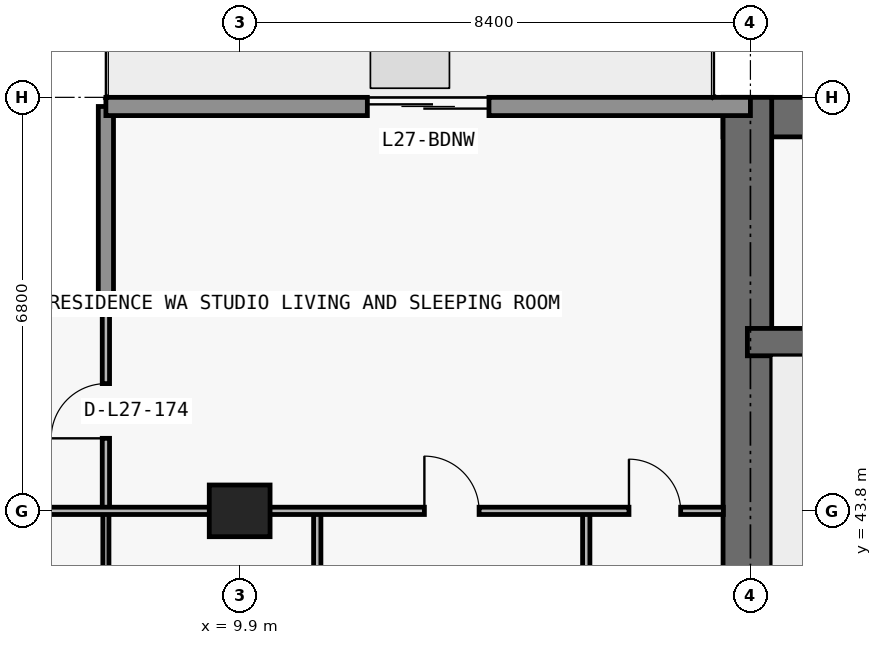
"""IFC4 building model, lengths in metres.
Left out: names, types, materials, properties, quantities, classifications, styles, units other than length and angle.
Written with IfcOpenShell. Run it as: python <this file> out.ifc"""

import sys

from ifc_helpers import new_model, si_unit, direction, frame, frame_2d, origin, origin_2d, place, context, subcontext, project, spatial, rectangle, extrude, element, fill, save


model = new_model("IFC4")
c1 = context("Model", 3, precision=1e-05, world=origin(), true_north=direction((0.0, 1.0)))
c2 = subcontext(c1, "Body", "Model", "MODEL_VIEW")
j1 = project(units=[si_unit("LENGTHUNIT", "METRE"), si_unit("PLANEANGLEUNIT", "RADIAN")], contexts=[c1])
p1 = place(None, origin())
s1 = spatial("IfcSite", under=j1, at=p1, CompositionType="ELEMENT")
p2 = place(p1, origin())
s2 = spatial("IfcBuilding", under=s1, at=p2, CompositionType="ELEMENT")
p3 = place(p2, frame((0.0, 0.0, 102.6)))
s3 = spatial("IfcBuildingStorey", under=s2, at=p3, CompositionType="ELEMENT", Elevation=102.6)
p4 = place(p3, frame((9.9, 43.8, 0.0), z_axis=(0.0, 0.0, 1.0), x_axis=(1.0, 0.0, 0.0)))
e1 = element("IfcColumn", 1, at=p4, inside=s3, PredefinedType="COLUMN", context=c2, shape_type="SweptSolid", body=[
    extrude(rectangle(XDim=1.0, YDim=0.85, at=origin_2d()), origin(), (0.0, 0.0, 1.0), 3.05),
])
p5 = place(p3, frame((17.85, 50.275, 0.0), z_axis=(0.0, 0.0, 1.0), x_axis=(1.0, 0.0, 0.0)))
e2 = element("IfcWall", 2, at=p5, inside=s3, PredefinedType="SHEAR", context=c2, shape_type="SweptSolid", body=[
    extrude(rectangle(XDim=42.1, YDim=0.65, at=frame_2d((21.05, 0.0))), origin(), (0.0, 0.0, 1.0), 3.05),
])
p6 = place(p3, frame((18.25, 36.55, 0.0), z_axis=(0.0, 0.0, 1.0), x_axis=(0.0, 1.0, 0.0)))
e3 = element("IfcWall", 3, at=p6, inside=s3, PredefinedType="SHEAR", context=c2, shape_type="SweptSolid", body=[
    extrude(rectangle(XDim=14.05, YDim=0.8, at=frame_2d((7.025, 0.0))), origin(), (0.0, 0.0, 1.0), 3.05),
])
p7 = place(p3, frame((18.25, 46.575, 0.0), z_axis=(0.0, 0.0, 1.0), x_axis=(1.0, 0.0, 0.0)))
e4 = element("IfcWall", 4, at=p7, inside=s3, PredefinedType="SHEAR", context=c2, shape_type="SweptSolid", body=[
    extrude(rectangle(XDim=41.3, YDim=0.45, at=frame_2d((20.65, 0.0))), origin(), (0.0, 0.0, 1.0), 3.05),
])
p8 = place(p7, frame((7.65, 0.0, 0.0)))
e5 = element("IfcOpeningElement", 5, at=p8, cuts=e4, PredefinedType="OPENING", context=c2, shape_type="SweptSolid", body=[
    extrude(rectangle(XDim=1.0, YDim=2.2, at=frame_2d((0.5, 1.1))), frame((0.0, 0.235, 0.0), z_axis=(0.0, -1.0, 0.0), x_axis=(1.0, 0.0, 0.0)), (0.0, 0.0, 1.0), 0.47),
])
p9 = place(p7, frame((32.675, 0.0, 0.0)))
e6 = element("IfcOpeningElement", 6, at=p9, cuts=e4, PredefinedType="OPENING", context=c2, shape_type="SweptSolid", body=[
    extrude(rectangle(XDim=1.05, YDim=2.15, at=frame_2d((0.525, 1.075))), frame((0.0, 0.235, 0.0), z_axis=(0.0, -1.0, 0.0), x_axis=(1.0, 0.0, 0.0)), (0.0, 0.0, 1.0), 0.47),
])
p10 = place(p3, frame((4.05, 47.2, 0.0), z_axis=(0.0, 0.0, 1.0), x_axis=(1.0, 0.0, 0.0)))
e7 = element("IfcWall", 7, at=p10, inside=s3, PredefinedType="ELEMENTEDWALL", context=c2, shape_type="SweptSolid", body=[
    extrude(rectangle(XDim=3.65, YDim=0.25, at=frame_2d((1.825, 0.0))), origin(), (0.0, 0.0, 1.0), 3.05),
])
p11 = place(p3, frame((7.7, 47.2, 0.0), z_axis=(0.0, 0.0, 1.0), x_axis=(0.0, 1.0, 0.0)))
e8 = element("IfcWall", 8, at=p11, inside=s3, PredefinedType="ELEMENTEDWALL", context=c2, shape_type="SweptSolid", body=[
    extrude(rectangle(XDim=3.25, YDim=0.25, at=frame_2d((1.625, 0.0))), origin(), (0.0, 0.0, 1.0), 3.05),
])
p12 = place(p3, frame((7.7, 50.45, 0.0), z_axis=(0.0, 0.0, 1.0), x_axis=(1.0, 0.0, 0.0)))
e9 = element("IfcWall", 9, at=p12, inside=s3, PredefinedType="STANDARD", context=c2, shape_type="SweptSolid", body=[
    extrude(rectangle(XDim=10.6, YDim=0.3, at=frame_2d((5.3, 0.0))), origin(), (0.0, 0.0, 1.0), 3.05),
])
p13 = place(p12, frame((4.3, 0.0, 0.0)))
e10 = element("IfcOpeningElement", 10, at=p13, cuts=e9, PredefinedType="OPENING", context=c2, shape_type="SweptSolid", body=[
    extrude(rectangle(XDim=2.0, YDim=2.3, at=frame_2d((1.0, 1.15))), frame((0.0, 0.16, 0.0), z_axis=(0.0, -1.0, 0.0), x_axis=(1.0, 0.0, 0.0)), (0.0, 0.0, 1.0), 0.32),
])
p14 = place(p3, frame((7.7, 36.955, 0.0), z_axis=(0.0, 0.0, 1.0), x_axis=(0.0, 1.0, 0.0)))
e11 = element("IfcWall", 11, at=p14, inside=s3, PredefinedType="MOVABLE", context=c2, shape_type="SweptSolid", body=[
    extrude(rectangle(XDim=6.845, YDim=0.1, at=frame_2d((3.422, 0.0))), origin(), (0.0, 0.0, 1.0), 3.05),
])
p15 = place(p14, frame((2.972, 0.0, 0.0)))
e12 = element("IfcOpeningElement", 12, at=p15, cuts=e11, PredefinedType="OPENING", context=c2, shape_type="SweptSolid", body=[
    extrude(rectangle(XDim=0.9, YDim=2.15, at=frame_2d((0.45, 1.075))), frame((0.0, 0.06, 0.0), z_axis=(0.0, -1.0, 0.0), x_axis=(1.0, 0.0, 0.0)), (0.0, 0.0, 1.0), 0.12),
])
p16 = place(p3, frame((7.7, 43.805, 0.0), z_axis=(0.0, 0.0, 1.0), x_axis=(0.0, 1.0, 0.0)))
e13 = element("IfcWall", 13, at=p16, inside=s3, PredefinedType="PARTITIONING", context=c2, shape_type="SweptSolid", body=[
    extrude(rectangle(XDim=3.275, YDim=0.12, at=frame_2d((1.638, 0.0))), origin(), (0.0, 0.0, 1.0), 3.05),
])
p17 = place(p16, frame((1.188, 0.0, 0.0)))
e14 = element("IfcOpeningElement", 14, at=p17, cuts=e13, PredefinedType="OPENING", context=c2, shape_type="SweptSolid", body=[
    extrude(rectangle(XDim=0.9, YDim=2.15, at=frame_2d((0.45, 1.075))), frame((0.0, 0.07, 0.0), z_axis=(0.0, -1.0, 0.0), x_axis=(1.0, 0.0, 0.0)), (0.0, 0.0, 1.0), 0.14),
])
p18 = place(p3, frame((11.176, 36.95, 0.0), z_axis=(0.0, 0.0, 1.0), x_axis=(0.0, 1.0, 0.0)))
e15 = element("IfcWall", 15, at=p18, inside=s3, PredefinedType="PARTITIONING", context=c2, shape_type="SweptSolid", body=[
    extrude(rectangle(XDim=6.85, YDim=0.12, at=frame_2d((3.425, 0.0))), origin(), (0.0, 0.0, 1.0), 3.05),
])
p19 = place(p18, frame((2.975, 0.0, 0.0)))
e16 = element("IfcOpeningElement", 16, at=p19, cuts=e15, PredefinedType="OPENING", context=c2, shape_type="SweptSolid", body=[
    extrude(rectangle(XDim=0.9, YDim=2.15, at=frame_2d((0.45, 1.075))), frame((0.0, 0.07, 0.0), z_axis=(0.0, -1.0, 0.0), x_axis=(1.0, 0.0, 0.0)), (0.0, 0.0, 1.0), 0.14),
])
p20 = place(p3, frame((15.6, 36.95, 0.0), z_axis=(0.0, 0.0, 1.0), x_axis=(0.0, 1.0, 0.0)))
e17 = element("IfcWall", 17, at=p20, inside=s3, PredefinedType="PARTITIONING", context=c2, shape_type="SweptSolid", body=[
    extrude(rectangle(XDim=6.85, YDim=0.12, at=frame_2d((3.425, 0.0))), origin(), (0.0, 0.0, 1.0), 3.05),
])
p21 = place(p20, frame((1.219, 0.0, 0.0)))
e18 = element("IfcOpeningElement", 18, at=p21, cuts=e17, PredefinedType="OPENING", context=c2, shape_type="SweptSolid", body=[
    extrude(rectangle(XDim=0.85, YDim=2.1, at=frame_2d((0.425, 1.05))), frame((0.0, 0.07, 0.0), z_axis=(0.0, -1.0, 0.0), x_axis=(1.0, 0.0, 0.0)), (0.0, 0.0, 1.0), 0.14),
])
p22 = place(p3, frame((4.195, 43.8, 0.0), z_axis=(0.0, 0.0, 1.0), x_axis=(1.0, 0.0, 0.0)))
e19 = element("IfcWall", 19, at=p22, inside=s3, PredefinedType="PARTITIONING", context=c2, shape_type="SweptSolid", body=[
    extrude(rectangle(XDim=13.66, YDim=0.12, at=frame_2d((6.83, 0.0))), origin(), (0.0, 0.0, 1.0), 2.339),
])
p23 = place(p22, frame((8.743, 0.0, 0.0)))
e20 = element("IfcOpeningElement", 20, at=p23, cuts=e19, PredefinedType="OPENING", context=c2, shape_type="SweptSolid", body=[
    extrude(rectangle(XDim=0.9, YDim=2.15, at=frame_2d((0.45, 1.075))), frame((0.0, 0.07, 0.0), z_axis=(0.0, -1.0, 0.0), x_axis=(1.0, 0.0, 0.0)), (0.0, 0.0, 1.0), 0.14),
])
p24 = place(p22, frame((12.107, 0.0, 0.0)))
e21 = element("IfcOpeningElement", 21, at=p24, cuts=e19, PredefinedType="OPENING", context=c2, shape_type="SweptSolid", body=[
    extrude(rectangle(XDim=0.85, YDim=2.1, at=frame_2d((0.425, 1.05))), frame((0.0, 0.07, 0.0), z_axis=(0.0, -1.0, 0.0), x_axis=(1.0, 0.0, 0.0)), (0.0, 0.0, 1.0), 0.14),
])
p25 = place(p13, origin())
e22 = element("IfcDoor", 22, at=p25, inside=s3, OperationType="DOUBLE_DOOR_SLIDING", PredefinedType="DOOR", context=c2, shape_type="SweptSolid", body=[
    extrude(rectangle(XDim=2.0, YDim=2.3, at=frame_2d((1.0, 1.15))), frame((0.0, 0.025, 0.0), z_axis=(0.0, -1.0, 0.0), x_axis=(1.0, 0.0, 0.0)), (0.0, 0.0, 1.0), 0.05),
])
fill(e10, e22)
p26 = place(p23, origin())
e23 = element("IfcDoor", 23, at=p26, inside=s3, OperationType="SINGLE_SWING_LEFT", PredefinedType="DOOR", context=c2, shape_type="SweptSolid", body=[
    extrude(rectangle(XDim=0.9, YDim=2.15, at=frame_2d((0.45, 1.075))), frame((0.0, 0.025, 0.0), z_axis=(0.0, -1.0, 0.0), x_axis=(1.0, 0.0, 0.0)), (0.0, 0.0, 1.0), 0.05),
])
fill(e20, e23)
p27 = place(p24, origin())
e24 = element("IfcDoor", 24, at=p27, inside=s3, OperationType="SINGLE_SWING_LEFT", PredefinedType="DOOR", context=c2, shape_type="SweptSolid", body=[
    extrude(rectangle(XDim=0.85, YDim=2.1, at=frame_2d((0.425, 1.05))), frame((0.0, 0.025, 0.0), z_axis=(0.0, -1.0, 0.0), x_axis=(1.0, 0.0, 0.0)), (0.0, 0.0, 1.0), 0.05),
])
fill(e21, e24)
p28 = place(p17, origin())
e25 = element("IfcDoor", 25, at=p28, inside=s3, OperationType="SINGLE_SWING_LEFT", PredefinedType="DOOR", context=c2, shape_type="SweptSolid", body=[
    extrude(rectangle(XDim=0.9, YDim=2.15, at=frame_2d((0.45, 1.075))), frame((0.0, 0.025, 0.0), z_axis=(0.0, -1.0, 0.0), x_axis=(1.0, 0.0, 0.0)), (0.0, 0.0, 1.0), 0.05),
])
fill(e14, e25)
save(model, sys.argv[1])
